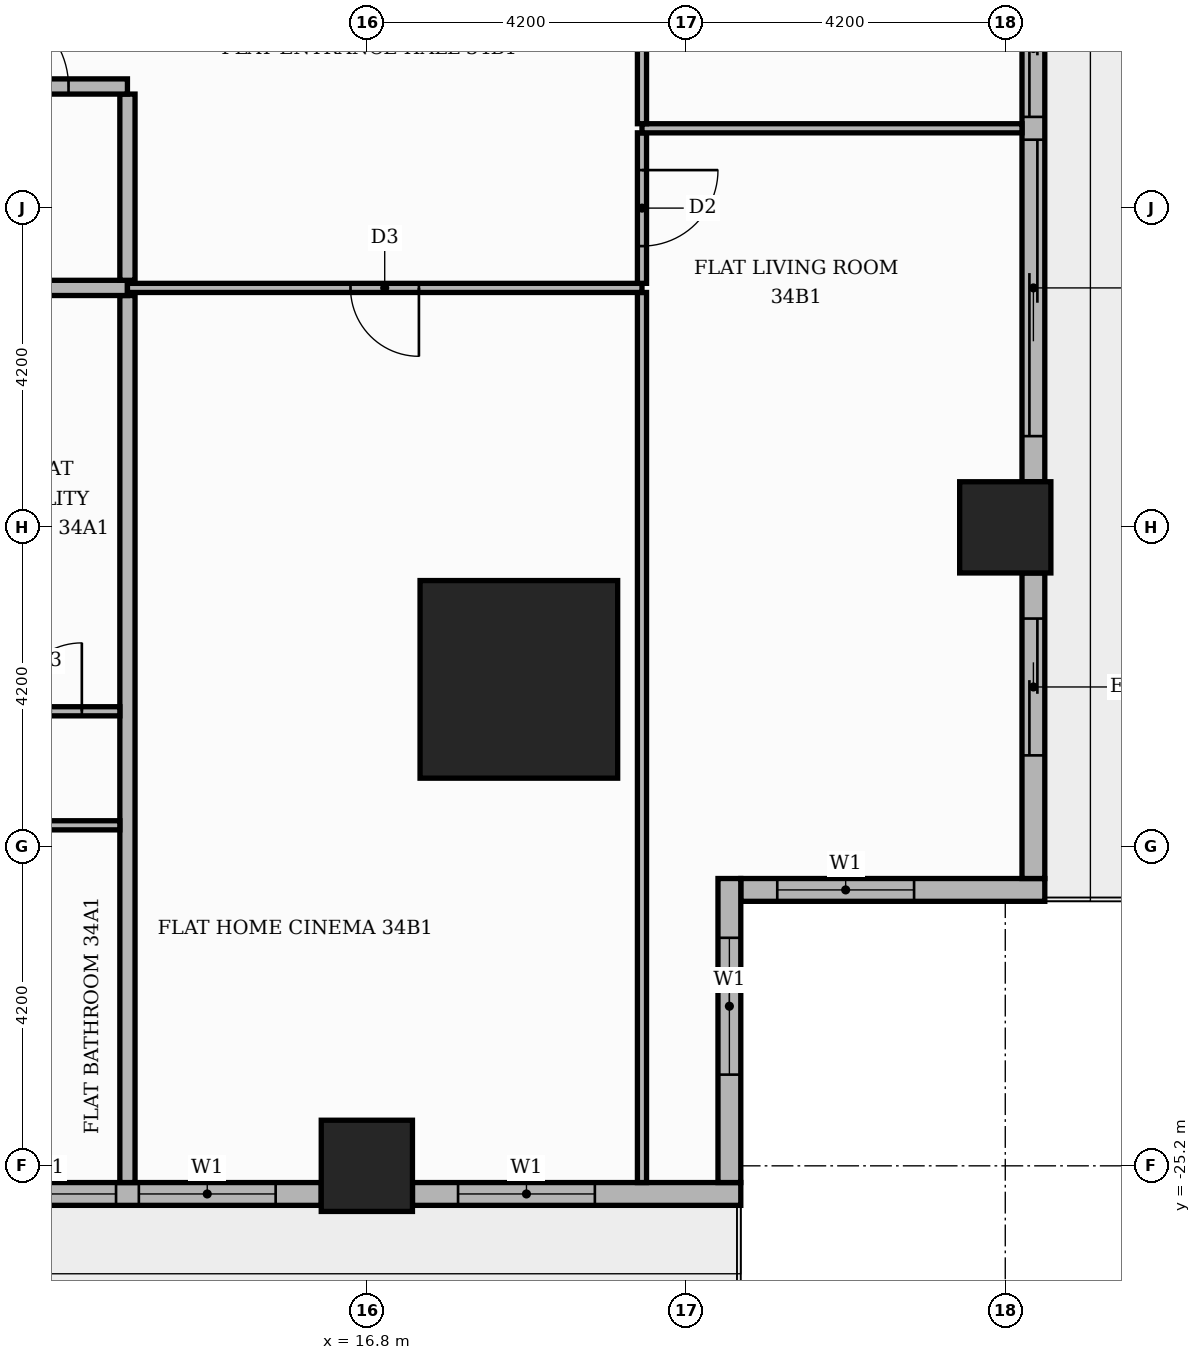
"""IFC4 building model, lengths in metres.
Left out: names, types, materials, properties, quantities, classifications, styles, units other than length and angle.
Written with IfcOpenShell. Run it as: python <this file> out.ifc"""

import sys

from ifc_helpers import new_model, si_unit, direction, frame, frame_2d, origin, origin_2d, place, context, subcontext, project, spatial, rectangle, extrude, element, fill, save


model = new_model("IFC4")
c1 = context("Model", 3, precision=1e-05, world=origin(), true_north=direction((0.0, 1.0)))
c2 = subcontext(c1, "Body", "Model", "MODEL_VIEW")
j1 = project(units=[si_unit("LENGTHUNIT", "METRE"), si_unit("PLANEANGLEUNIT", "RADIAN")], contexts=[c1])
p1 = place(None, origin())
s1 = spatial("IfcSite", under=j1, at=p1, CompositionType="ELEMENT")
p2 = place(p1, origin())
s2 = spatial("IfcBuilding", under=s1, at=p2, CompositionType="ELEMENT")
p3 = place(p2, frame((0.0, 0.0, 145.5)))
s3 = spatial("IfcBuildingStorey", under=s2, at=p3, CompositionType="ELEMENT", Elevation=145.5)
p4 = place(p3, frame((18.8, -18.8, 0.0), z_axis=(0.0, 0.0, 1.0), x_axis=(1.0, 0.0, 0.0)))
e1 = element("IfcColumn", 1, at=p4, inside=s3, PredefinedType="COLUMN", context=c2, shape_type="SweptSolid", body=[
    extrude(rectangle(XDim=2.6, YDim=2.6, at=origin_2d()), origin(), (0.0, 0.0, 1.0), 3.9),
])
for number, where, z_axis, x_axis in (
    (2, (25.2, -16.8, 0.0), (0.0, 0.0, 1.0), (1.0, 0.0, 0.0)),
    (3, (16.8, -25.2, 0.0), (0.0, 0.0, 1.0), (1.0, 0.0, 0.0)),
):
    element("IfcColumn", number, at=place(p3, frame(where, z_axis=z_axis, x_axis=x_axis)), inside=s3, PredefinedType="COLUMN", context=c2, shape_type="SweptSolid", body=[
        extrude(rectangle(XDim=1.2, YDim=1.2, at=origin_2d()), origin(), (0.0, 0.0, 1.0), 3.9),
    ])
p5 = place(p3, frame((21.72, -21.57, 0.0), z_axis=(0.0, 0.0, 1.0), x_axis=(1.0, 0.0, 0.0)))
e4 = element("IfcWall", 4, at=p5, inside=s3, PredefinedType="STANDARD", context=c2, shape_type="SweptSolid", body=[
    extrude(rectangle(XDim=4.0, YDim=0.3, at=frame_2d((2.0, 0.0))), origin(), (0.0, 0.0, 1.0), 3.48),
])
p6 = place(p5, frame((0.48, 0.0, 0.9)))
e5 = element("IfcOpeningElement", 5, at=p6, cuts=e4, PredefinedType="OPENING", context=c2, shape_type="SweptSolid", body=[
    extrude(rectangle(XDim=1.8, YDim=2.1, at=frame_2d((0.9, 1.05))), frame((0.0, 0.16, 0.0), z_axis=(0.0, -1.0, 0.0), x_axis=(1.0, 0.0, 0.0)), (0.0, 0.0, 1.0), 0.32),
])
p7 = place(p3, frame((25.57, -21.42, 0.0), z_axis=(0.0, 0.0, 1.0), x_axis=(0.0, 1.0, 0.0)))
e6 = element("IfcWall", 6, at=p7, inside=s3, PredefinedType="STANDARD", context=c2, shape_type="SweptSolid", body=[
    extrude(rectangle(XDim=4.02, YDim=0.3, at=frame_2d((2.01, 0.0))), origin(), (0.0, 0.0, 1.0), 3.48),
])
p8 = place(p7, frame((1.62, 0.0, 0.0)))
e7 = element("IfcOpeningElement", 7, at=p8, cuts=e6, PredefinedType="OPENING", context=c2, shape_type="SweptSolid", body=[
    extrude(rectangle(XDim=1.8, YDim=2.4, at=frame_2d((0.9, 1.2))), frame((0.0, 0.16, 0.0), z_axis=(0.0, -1.0, 0.0), x_axis=(1.0, 0.0, 0.0)), (0.0, 0.0, 1.0), 0.32),
])
p9 = place(p3, frame((25.57, -16.2, 0.0), z_axis=(0.0, 0.0, 1.0), x_axis=(0.0, 1.0, 0.0)))
e8 = element("IfcWall", 8, at=p9, inside=s3, PredefinedType="STANDARD", context=c2, shape_type="SweptSolid", body=[
    extrude(rectangle(XDim=7.2, YDim=0.3, at=frame_2d((3.6, 0.0))), origin(), (0.0, 0.0, 1.0), 3.48),
])
p10 = place(p9, frame((0.6, 0.0, 0.0)))
e9 = element("IfcOpeningElement", 9, at=p10, cuts=e8, PredefinedType="OPENING", context=c2, shape_type="SweptSolid", body=[
    extrude(rectangle(XDim=3.9, YDim=2.4, at=frame_2d((1.95, 1.2))), frame((0.0, 0.16, 0.0), z_axis=(0.0, -1.0, 0.0), x_axis=(1.0, 0.0, 0.0)), (0.0, 0.0, 1.0), 0.32),
])
p11 = place(p9, frame((4.8, 0.0, 0.0)))
e10 = element("IfcOpeningElement", 10, at=p11, cuts=e8, PredefinedType="OPENING", context=c2, shape_type="SweptSolid", body=[
    extrude(rectangle(XDim=1.8, YDim=2.4, at=frame_2d((0.9, 1.2))), frame((0.0, 0.16, 0.0), z_axis=(0.0, -1.0, 0.0), x_axis=(1.0, 0.0, 0.0)), (0.0, 0.0, 1.0), 0.32),
])
p12 = place(p3, frame((9.0, -25.57, 0.0), z_axis=(0.0, 0.0, 1.0), x_axis=(1.0, 0.0, 0.0)))
e11 = element("IfcWall", 11, at=p12, inside=s3, PredefinedType="STANDARD", context=c2, shape_type="SweptSolid", body=[
    extrude(rectangle(XDim=7.2, YDim=0.3, at=frame_2d((3.6, 0.0))), origin(), (0.0, 0.0, 1.0), 3.48),
])
p13 = place(p12, frame((0.6, 0.0, 0.9)))
e12 = element("IfcOpeningElement", 12, at=p13, cuts=e11, PredefinedType="OPENING", context=c2, shape_type="SweptSolid", body=[
    extrude(rectangle(XDim=1.8, YDim=2.1, at=frame_2d((0.9, 1.05))), frame((0.0, 0.16, 0.0), z_axis=(0.0, -1.0, 0.0), x_axis=(1.0, 0.0, 0.0)), (0.0, 0.0, 1.0), 0.32),
])
p14 = place(p12, frame((2.7, 0.0, 0.9)))
e13 = element("IfcOpeningElement", 13, at=p14, cuts=e11, PredefinedType="OPENING", context=c2, shape_type="SweptSolid", body=[
    extrude(rectangle(XDim=1.8, YDim=2.1, at=frame_2d((0.9, 1.05))), frame((0.0, 0.16, 0.0), z_axis=(0.0, -1.0, 0.0), x_axis=(1.0, 0.0, 0.0)), (0.0, 0.0, 1.0), 0.32),
])
p15 = place(p12, frame((4.8, 0.0, 0.9)))
e14 = element("IfcOpeningElement", 14, at=p15, cuts=e11, PredefinedType="OPENING", context=c2, shape_type="SweptSolid", body=[
    extrude(rectangle(XDim=1.8, YDim=2.1, at=frame_2d((0.9, 1.05))), frame((0.0, 0.16, 0.0), z_axis=(0.0, -1.0, 0.0), x_axis=(1.0, 0.0, 0.0)), (0.0, 0.0, 1.0), 0.32),
])
p16 = place(p3, frame((17.4, -25.57, 0.0), z_axis=(0.0, 0.0, 1.0), x_axis=(1.0, 0.0, 0.0)))
e15 = element("IfcWall", 15, at=p16, inside=s3, PredefinedType="STANDARD", context=c2, shape_type="SweptSolid", body=[
    extrude(rectangle(XDim=4.32, YDim=0.3, at=frame_2d((2.16, 0.0))), origin(), (0.0, 0.0, 1.0), 3.48),
])
p17 = place(p16, frame((0.6, 0.0, 0.9)))
e16 = element("IfcOpeningElement", 16, at=p17, cuts=e15, PredefinedType="OPENING", context=c2, shape_type="SweptSolid", body=[
    extrude(rectangle(XDim=1.8, YDim=2.1, at=frame_2d((0.9, 1.05))), frame((0.0, 0.16, 0.0), z_axis=(0.0, -1.0, 0.0), x_axis=(1.0, 0.0, 0.0)), (0.0, 0.0, 1.0), 0.32),
])
p18 = place(p3, frame((21.57, -25.42, 0.0), z_axis=(0.0, 0.0, 1.0), x_axis=(0.0, 1.0, 0.0)))
e17 = element("IfcWall", 17, at=p18, inside=s3, PredefinedType="STANDARD", context=c2, shape_type="SweptSolid", body=[
    extrude(rectangle(XDim=4.0, YDim=0.3, at=frame_2d((2.0, 0.0))), origin(), (0.0, 0.0, 1.0), 3.48),
])
p19 = place(p18, frame((1.42, 0.0, 0.9)))
e18 = element("IfcOpeningElement", 18, at=p19, cuts=e17, PredefinedType="OPENING", context=c2, shape_type="SweptSolid", body=[
    extrude(rectangle(XDim=1.8, YDim=2.1, at=frame_2d((0.9, 1.05))), frame((0.0, 0.16, 0.0), z_axis=(0.0, -1.0, 0.0), x_axis=(1.0, 0.0, 0.0)), (0.0, 0.0, 1.0), 0.32),
])
p20 = place(p3, frame((13.65, -25.42, 0.0), z_axis=(0.0, 0.0, 1.0), x_axis=(0.0, 1.0, 0.0)))
e19 = element("IfcWall", 19, at=p20, inside=s3, PredefinedType="PARTITIONING", context=c2, shape_type="SweptSolid", body=[
    extrude(rectangle(XDim=11.67, YDim=0.2, at=frame_2d((5.835, 0.0))), origin(), (0.0, 0.0, 1.0), 3.48),
])
p21 = place(p3, frame((20.42, -25.42, 0.0), z_axis=(0.0, 0.0, 1.0), x_axis=(0.0, 1.0, 0.0)))
e20 = element("IfcWall", 20, at=p21, inside=s3, PredefinedType="PARTITIONING", context=c2, shape_type="SweptSolid", body=[
    extrude(rectangle(XDim=11.71, YDim=0.12, at=frame_2d((5.855, 0.0))), origin(), (0.0, 0.0, 1.0), 3.48),
])
p22 = place(p3, frame((-25.42, -20.72, 0.0), z_axis=(0.0, 0.0, 1.0), x_axis=(1.0, 0.0, 0.0)))
e21 = element("IfcWall", 21, at=p22, inside=s3, PredefinedType="PARTITIONING", context=c2, shape_type="SweptSolid", body=[
    extrude(rectangle(XDim=38.97, YDim=0.12, at=frame_2d((19.485, 0.0))), origin(), (0.0, 0.0, 1.0), 3.48),
])
p23 = place(p22, frame((12.32, 0.0, 0.0)))
e22 = element("IfcOpeningElement", 22, at=p23, cuts=e21, PredefinedType="OPENING", context=c2, shape_type="SweptSolid", body=[
    extrude(rectangle(XDim=1.0, YDim=2.1, at=frame_2d((0.5, 1.05))), frame((0.0, 0.07, 0.0), z_axis=(0.0, -1.0, 0.0), x_axis=(1.0, 0.0, 0.0)), (0.0, 0.0, 1.0), 0.14),
])
p24 = place(p22, frame((17.57, 0.0, 0.0)))
e23 = element("IfcOpeningElement", 23, at=p24, cuts=e21, PredefinedType="OPENING", context=c2, shape_type="SweptSolid", body=[
    extrude(rectangle(XDim=1.0, YDim=2.1, at=frame_2d((0.5, 1.05))), frame((0.0, 0.07, 0.0), z_axis=(0.0, -1.0, 0.0), x_axis=(1.0, 0.0, 0.0)), (0.0, 0.0, 1.0), 0.14),
])
p25 = place(p22, frame((24.97, 0.0, 0.0)))
e24 = element("IfcOpeningElement", 24, at=p25, cuts=e21, PredefinedType="OPENING", context=c2, shape_type="SweptSolid", body=[
    extrude(rectangle(XDim=0.9, YDim=2.1, at=frame_2d((0.45, 1.05))), frame((0.0, 0.07, 0.0), z_axis=(0.0, -1.0, 0.0), x_axis=(1.0, 0.0, 0.0)), (0.0, 0.0, 1.0), 0.14),
])
p26 = place(p22, frame((34.42, 0.0, 0.0)))
e25 = element("IfcOpeningElement", 25, at=p26, cuts=e21, PredefinedType="OPENING", context=c2, shape_type="SweptSolid", body=[
    extrude(rectangle(XDim=0.9, YDim=2.1, at=frame_2d((0.45, 1.05))), frame((0.0, 0.07, 0.0), z_axis=(0.0, -1.0, 0.0), x_axis=(1.0, 0.0, 0.0)), (0.0, 0.0, 1.0), 0.14),
])
p27 = place(p3, frame((-7.35, -19.22, 0.0), z_axis=(0.0, 0.0, 1.0), x_axis=(1.0, 0.0, 0.0)))
e26 = element("IfcWall", 26, at=p27, inside=s3, PredefinedType="PARTITIONING", context=c2, shape_type="SweptSolid", body=[
    extrude(rectangle(XDim=20.9, YDim=0.12, at=frame_2d((10.45, 0.0))), origin(), (0.0, 0.0, 1.0), 3.48),
])
p28 = place(p27, frame((2.7, 0.0, 0.0)))
e27 = element("IfcOpeningElement", 27, at=p28, cuts=e26, PredefinedType="OPENING", context=c2, shape_type="SweptSolid", body=[
    extrude(rectangle(XDim=0.9, YDim=2.1, at=frame_2d((0.45, 1.05))), frame((0.0, 0.07, 0.0), z_axis=(0.0, -1.0, 0.0), x_axis=(1.0, 0.0, 0.0)), (0.0, 0.0, 1.0), 0.14),
])
p29 = place(p27, frame((7.95, 0.0, 0.0)))
e28 = element("IfcOpeningElement", 28, at=p29, cuts=e26, PredefinedType="OPENING", context=c2, shape_type="SweptSolid", body=[
    extrude(rectangle(XDim=0.9, YDim=2.1, at=frame_2d((0.45, 1.05))), frame((0.0, 0.07, 0.0), z_axis=(0.0, -1.0, 0.0), x_axis=(1.0, 0.0, 0.0)), (0.0, 0.0, 1.0), 0.14),
])
p30 = place(p27, frame((11.1, 0.0, 0.0)))
e29 = element("IfcOpeningElement", 29, at=p30, cuts=e26, PredefinedType="OPENING", context=c2, shape_type="SweptSolid", body=[
    extrude(rectangle(XDim=0.9, YDim=2.1, at=frame_2d((0.45, 1.05))), frame((0.0, 0.07, 0.0), z_axis=(0.0, -1.0, 0.0), x_axis=(1.0, 0.0, 0.0)), (0.0, 0.0, 1.0), 0.14),
])
p31 = place(p27, frame((13.95, 0.0, 0.0)))
e30 = element("IfcOpeningElement", 30, at=p31, cuts=e26, PredefinedType="OPENING", context=c2, shape_type="SweptSolid", body=[
    extrude(rectangle(XDim=0.9, YDim=2.1, at=frame_2d((0.45, 1.05))), frame((0.0, 0.07, 0.0), z_axis=(0.0, -1.0, 0.0), x_axis=(1.0, 0.0, 0.0)), (0.0, 0.0, 1.0), 0.14),
])
p32 = place(p27, frame((17.1, 0.0, 0.0)))
e31 = element("IfcOpeningElement", 31, at=p32, cuts=e26, PredefinedType="OPENING", context=c2, shape_type="SweptSolid", body=[
    extrude(rectangle(XDim=0.9, YDim=2.1, at=frame_2d((0.45, 1.05))), frame((0.0, 0.07, 0.0), z_axis=(0.0, -1.0, 0.0), x_axis=(1.0, 0.0, 0.0)), (0.0, 0.0, 1.0), 0.14),
])
p33 = place(p27, frame((19.5, 0.0, 0.0)))
e32 = element("IfcOpeningElement", 32, at=p33, cuts=e26, PredefinedType="OPENING", context=c2, shape_type="SweptSolid", body=[
    extrude(rectangle(XDim=0.9, YDim=2.1, at=frame_2d((0.45, 1.05))), frame((0.0, 0.07, 0.0), z_axis=(0.0, -1.0, 0.0), x_axis=(1.0, 0.0, 0.0)), (0.0, 0.0, 1.0), 0.14),
])
p34 = place(p3, frame((-25.42, -13.65, 0.0), z_axis=(0.0, 0.0, 1.0), x_axis=(1.0, 0.0, 0.0)))
e33 = element("IfcWall", 33, at=p34, inside=s3, PredefinedType="PARTITIONING", context=c2, shape_type="SweptSolid", body=[
    extrude(rectangle(XDim=39.07, YDim=0.2, at=frame_2d((19.535, 0.0))), origin(), (0.0, 0.0, 1.0), 3.48),
])
p35 = place(p34, frame((14.37, 0.0, 0.0)))
e34 = element("IfcOpeningElement", 34, at=p35, cuts=e33, PredefinedType="OPENING", context=c2, shape_type="SweptSolid", body=[
    extrude(rectangle(XDim=1.1, YDim=2.4, at=frame_2d((0.55, 1.2))), frame((0.0, 0.11, 0.0), z_axis=(0.0, -1.0, 0.0), x_axis=(1.0, 0.0, 0.0)), (0.0, 0.0, 1.0), 0.22),
])
p36 = place(p3, frame((13.65, -13.65, 0.0), z_axis=(0.0, 0.0, 1.0), x_axis=(1.0, 0.0, 0.0)))
e35 = element("IfcWall", 35, at=p36, inside=s3, PredefinedType="PARTITIONING", context=c2, shape_type="SweptSolid", body=[
    extrude(rectangle(XDim=6.77, YDim=0.12, at=frame_2d((3.385, 0.0))), origin(), (0.0, 0.0, 1.0), 3.48),
])
p37 = place(p36, frame((2.935, 0.0, 0.0)))
e36 = element("IfcOpeningElement", 36, at=p37, cuts=e35, PredefinedType="OPENING", context=c2, shape_type="SweptSolid", body=[
    extrude(rectangle(XDim=0.9, YDim=2.1, at=frame_2d((0.45, 1.05))), frame((0.0, 0.07, 0.0), z_axis=(0.0, -1.0, 0.0), x_axis=(1.0, 0.0, 0.0)), (0.0, 0.0, 1.0), 0.14),
])
p38 = place(p3, frame((20.42, -13.59, 0.0), z_axis=(0.0, 0.0, 1.0), x_axis=(0.0, 1.0, 0.0)))
e37 = element("IfcWall", 37, at=p38, inside=s3, PredefinedType="PARTITIONING", context=c2, shape_type="SweptSolid", body=[
    extrude(rectangle(XDim=1.98, YDim=0.12, at=frame_2d((0.99, 0.0))), origin(), (0.0, 0.0, 1.0), 3.48),
])
p39 = place(p38, frame((0.49, 0.0, 0.0)))
e38 = element("IfcOpeningElement", 38, at=p39, cuts=e37, PredefinedType="OPENING", context=c2, shape_type="SweptSolid", body=[
    extrude(rectangle(XDim=1.0, YDim=2.1, at=frame_2d((0.5, 1.05))), frame((0.0, 0.07, 0.0), z_axis=(0.0, -1.0, 0.0), x_axis=(1.0, 0.0, 0.0)), (0.0, 0.0, 1.0), 0.14),
])
p40 = place(p3, frame((13.65, -13.55, 0.0), z_axis=(0.0, 0.0, 1.0), x_axis=(0.0, 1.0, 0.0)))
e39 = element("IfcWall", 39, at=p40, inside=s3, PredefinedType="PARTITIONING", context=c2, shape_type="SweptSolid", body=[
    extrude(rectangle(XDim=2.45, YDim=0.2, at=frame_2d((1.225, 0.0))), origin(), (0.0, 0.0, 1.0), 3.48),
])
p41 = place(p3, frame((20.42, -11.55, 0.0), z_axis=(0.0, 0.0, 1.0), x_axis=(1.0, 0.0, 0.0)))
e40 = element("IfcWall", 40, at=p41, inside=s3, PredefinedType="PARTITIONING", context=c2, shape_type="SweptSolid", body=[
    extrude(rectangle(XDim=5.0, YDim=0.12, at=frame_2d((2.5, 0.0))), origin(), (0.0, 0.0, 1.0), 3.48),
])
p42 = place(p3, frame((20.42, -11.49, 0.0), z_axis=(0.0, 0.0, 1.0), x_axis=(0.0, 1.0, 0.0)))
e41 = element("IfcWall", 41, at=p42, inside=s3, PredefinedType="PARTITIONING", context=c2, shape_type="SweptSolid", body=[
    extrude(rectangle(XDim=8.28, YDim=0.12, at=frame_2d((4.14, 0.0))), origin(), (0.0, 0.0, 1.0), 3.48),
])
p43 = place(p42, frame((3.69, 0.0, 0.0)))
e42 = element("IfcOpeningElement", 42, at=p43, cuts=e41, PredefinedType="OPENING", context=c2, shape_type="SweptSolid", body=[
    extrude(rectangle(XDim=0.9, YDim=2.1, at=frame_2d((0.45, 1.05))), frame((0.0, 0.07, 0.0), z_axis=(0.0, -1.0, 0.0), x_axis=(1.0, 0.0, 0.0)), (0.0, 0.0, 1.0), 0.14),
])
p44 = place(p3, frame((11.0, -11.0, 0.0), z_axis=(0.0, 0.0, 1.0), x_axis=(1.0, 0.0, 0.0)))
e43 = element("IfcWall", 43, at=p44, inside=s3, PredefinedType="PARTITIONING", context=c2, shape_type="SweptSolid", body=[
    extrude(rectangle(XDim=2.65, YDim=0.2, at=frame_2d((1.325, 0.0))), origin(), (0.0, 0.0, 1.0), 3.48),
])
p45 = place(p44, frame((0.775, 0.0, 0.0)))
e44 = element("IfcOpeningElement", 44, at=p45, cuts=e43, PredefinedType="OPENING", context=c2, shape_type="SweptSolid", body=[
    extrude(rectangle(XDim=1.1, YDim=2.4, at=frame_2d((0.55, 1.2))), frame((0.0, 0.11, 0.0), z_axis=(0.0, -1.0, 0.0), x_axis=(1.0, 0.0, 0.0)), (0.0, 0.0, 1.0), 0.22),
])
p46 = place(p6, origin())
e45 = element("IfcWindow", 45, at=p46, inside=s3, PartitioningType="SINGLE_PANEL", PredefinedType="WINDOW", context=c2, shape_type="SweptSolid", body=[
    extrude(rectangle(XDim=1.8, YDim=2.1, at=frame_2d((0.9, 1.05))), frame((0.0, 0.03, 0.0), z_axis=(0.0, -1.0, 0.0), x_axis=(1.0, 0.0, 0.0)), (0.0, 0.0, 1.0), 0.06),
])
fill(e5, e45)
p47 = place(p8, origin())
e46 = element("IfcDoor", 46, at=p47, inside=s3, OperationType="SLIDING_TO_RIGHT", PredefinedType="DOOR", context=c2, shape_type="SweptSolid", body=[
    extrude(rectangle(XDim=1.8, YDim=2.4, at=frame_2d((0.9, 1.2))), frame((0.0, 0.025, 0.0), z_axis=(0.0, -1.0, 0.0), x_axis=(1.0, 0.0, 0.0)), (0.0, 0.0, 1.0), 0.05),
])
fill(e7, e46)
p48 = place(p10, origin())
e47 = element("IfcDoor", 47, at=p48, inside=s3, OperationType="SLIDING_TO_LEFT", PredefinedType="DOOR", context=c2, shape_type="SweptSolid", body=[
    extrude(rectangle(XDim=3.9, YDim=2.4, at=frame_2d((1.95, 1.2))), frame((0.0, 0.025, 0.0), z_axis=(0.0, -1.0, 0.0), x_axis=(1.0, 0.0, 0.0)), (0.0, 0.0, 1.0), 0.05),
])
fill(e9, e47)
p49 = place(p11, origin())
e48 = element("IfcDoor", 48, at=p49, inside=s3, OperationType="SLIDING_TO_RIGHT", PredefinedType="DOOR", context=c2, shape_type="SweptSolid", body=[
    extrude(rectangle(XDim=1.8, YDim=2.4, at=frame_2d((0.9, 1.2))), frame((0.0, 0.025, 0.0), z_axis=(0.0, -1.0, 0.0), x_axis=(1.0, 0.0, 0.0)), (0.0, 0.0, 1.0), 0.05),
])
fill(e10, e48)
p50 = place(p14, origin())
e49 = element("IfcWindow", 49, at=p50, inside=s3, PartitioningType="SINGLE_PANEL", PredefinedType="WINDOW", context=c2, shape_type="SweptSolid", body=[
    extrude(rectangle(XDim=1.8, YDim=2.1, at=frame_2d((0.9, 1.05))), frame((0.0, 0.03, 0.0), z_axis=(0.0, -1.0, 0.0), x_axis=(1.0, 0.0, 0.0)), (0.0, 0.0, 1.0), 0.06),
])
fill(e13, e49)
p51 = place(p15, origin())
e50 = element("IfcWindow", 50, at=p51, inside=s3, PartitioningType="SINGLE_PANEL", PredefinedType="WINDOW", context=c2, shape_type="SweptSolid", body=[
    extrude(rectangle(XDim=1.8, YDim=2.1, at=frame_2d((0.9, 1.05))), frame((0.0, 0.03, 0.0), z_axis=(0.0, -1.0, 0.0), x_axis=(1.0, 0.0, 0.0)), (0.0, 0.0, 1.0), 0.06),
])
fill(e14, e50)
p52 = place(p17, origin())
e51 = element("IfcWindow", 51, at=p52, inside=s3, PartitioningType="SINGLE_PANEL", PredefinedType="WINDOW", context=c2, shape_type="SweptSolid", body=[
    extrude(rectangle(XDim=1.8, YDim=2.1, at=frame_2d((0.9, 1.05))), frame((0.0, 0.03, 0.0), z_axis=(0.0, -1.0, 0.0), x_axis=(1.0, 0.0, 0.0)), (0.0, 0.0, 1.0), 0.06),
])
fill(e16, e51)
p53 = place(p19, origin())
e52 = element("IfcWindow", 52, at=p53, inside=s3, PartitioningType="SINGLE_PANEL", PredefinedType="WINDOW", context=c2, shape_type="SweptSolid", body=[
    extrude(rectangle(XDim=1.8, YDim=2.1, at=frame_2d((0.9, 1.05))), frame((0.0, 0.03, 0.0), z_axis=(0.0, -1.0, 0.0), x_axis=(1.0, 0.0, 0.0)), (0.0, 0.0, 1.0), 0.06),
])
fill(e18, e52)
p54 = place(p33, origin())
e53 = element("IfcDoor", 53, at=p54, inside=s3, OperationType="SINGLE_SWING_RIGHT", PredefinedType="DOOR", context=c2, shape_type="SweptSolid", body=[
    extrude(rectangle(XDim=0.9, YDim=2.1, at=frame_2d((0.45, 1.05))), frame((0.0, 0.025, 0.0), z_axis=(0.0, -1.0, 0.0), x_axis=(1.0, 0.0, 0.0)), (0.0, 0.0, 1.0), 0.05),
])
fill(e32, e53)
p55 = place(p45, origin())
e54 = element("IfcDoor", 54, at=p55, inside=s3, OperationType="SINGLE_SWING_LEFT", PredefinedType="DOOR", context=c2, shape_type="SweptSolid", body=[
    extrude(rectangle(XDim=1.1, YDim=2.4, at=frame_2d((0.55, 1.2))), frame((0.0, 0.025, 0.0), z_axis=(0.0, -1.0, 0.0), x_axis=(1.0, 0.0, 0.0)), (0.0, 0.0, 1.0), 0.05),
])
fill(e44, e54)
p56 = place(p37, frame((0.9, 0.0, 0.0), z_axis=(0.0, 0.0, 1.0), x_axis=(-1.0, 0.0, 0.0)))
e55 = element("IfcDoor", 55, at=p56, inside=s3, OperationType="SINGLE_SWING_RIGHT", PredefinedType="DOOR", context=c2, shape_type="SweptSolid", body=[
    extrude(rectangle(XDim=0.9, YDim=2.1, at=frame_2d((0.45, 1.05))), frame((0.0, 0.025, 0.0), z_axis=(0.0, -1.0, 0.0), x_axis=(1.0, 0.0, 0.0)), (0.0, 0.0, 1.0), 0.05),
])
fill(e36, e55)
p57 = place(p39, frame((1.0, 0.0, 0.0), z_axis=(0.0, 0.0, 1.0), x_axis=(-1.0, 0.0, 0.0)))
e56 = element("IfcDoor", 56, at=p57, inside=s3, OperationType="SINGLE_SWING_RIGHT", PredefinedType="DOOR", context=c2, shape_type="SweptSolid", body=[
    extrude(rectangle(XDim=1.0, YDim=2.1, at=frame_2d((0.5, 1.05))), frame((0.0, 0.025, 0.0), z_axis=(0.0, -1.0, 0.0), x_axis=(1.0, 0.0, 0.0)), (0.0, 0.0, 1.0), 0.05),
])
fill(e38, e56)
save(model, sys.argv[1])
